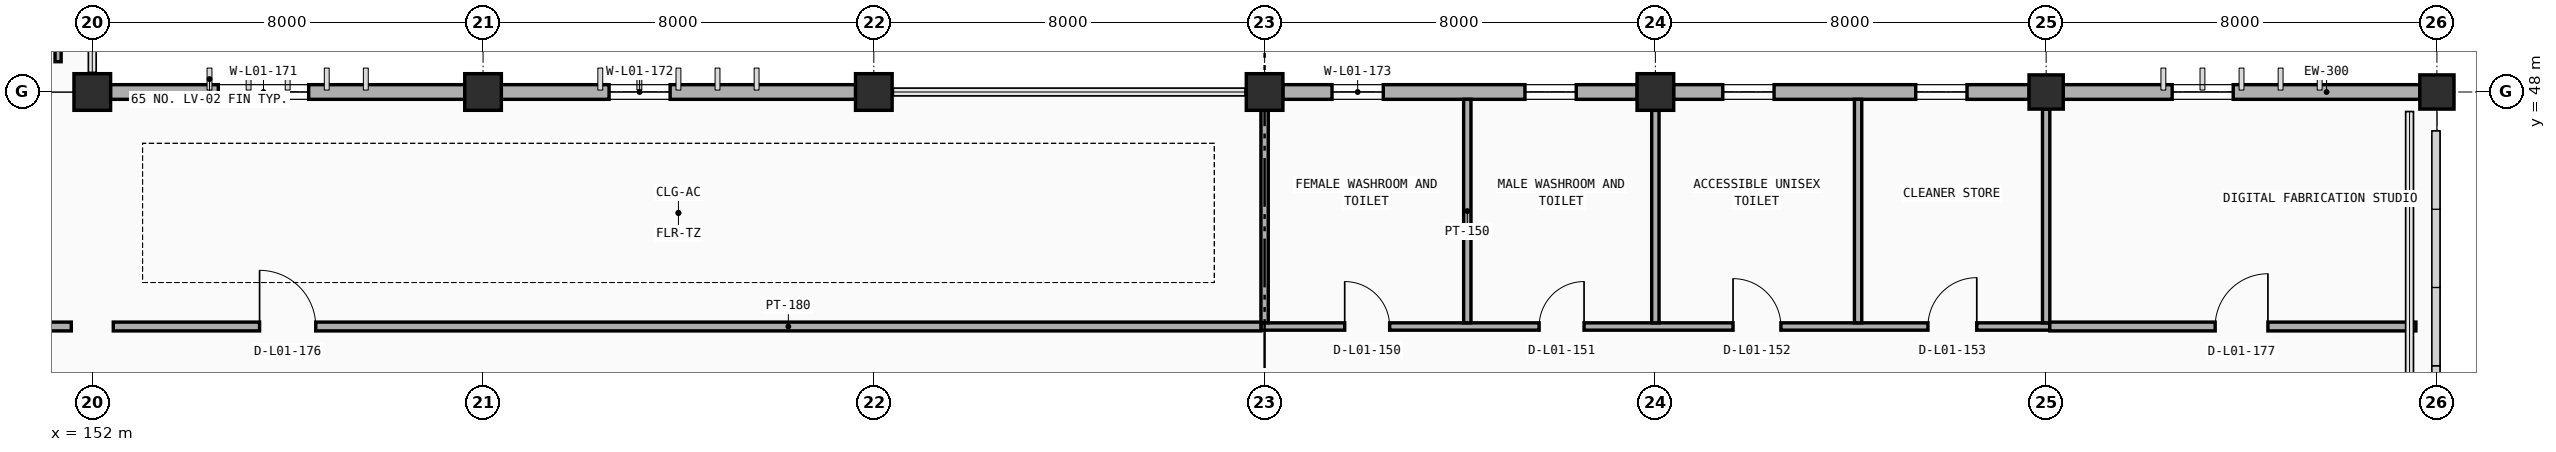
"""IFC4 building model, lengths in metres.
Left out: names, types, materials, properties, quantities, classifications, styles, units other than length and angle.
Written with IfcOpenShell. Run it as: python <this file> out.ifc"""

import sys

from ifc_helpers import new_model, si_unit, direction, frame, frame_2d, origin, origin_2d, place, context, subcontext, project, spatial, rectangle, extrude, element, fill, save


model = new_model("IFC4")
c1 = context("Model", 3, precision=1e-05, world=origin(), true_north=direction((0.0, 1.0)))
c2 = subcontext(c1, "Body", "Model", "MODEL_VIEW")
j1 = project(units=[si_unit("LENGTHUNIT", "METRE"), si_unit("PLANEANGLEUNIT", "RADIAN")], contexts=[c1])
p1 = place(None, origin())
s1 = spatial("IfcSite", under=j1, at=p1, CompositionType="ELEMENT")
p2 = place(p1, origin())
s2 = spatial("IfcBuilding", under=s1, at=p2, CompositionType="ELEMENT")
p3 = place(p2, origin())
s3 = spatial("IfcBuildingStorey", under=s2, at=p3, CompositionType="ELEMENT", Elevation=0.0)
for number, where, z_axis, x_axis in (
    (1, (152.0, 48.0, 0.0), (0.0, 0.0, 1.0), (1.0, 0.0, 0.0)),
    (2, (160.0, 48.0, 0.0), (0.0, 0.0, 1.0), (1.0, 0.0, 0.0)),
    (3, (168.0, 48.0, 0.0), (0.0, 0.0, 1.0), (1.0, 0.0, 0.0)),
    (4, (176.0, 48.0, 0.0), (0.0, 0.0, 1.0), (1.0, 0.0, 0.0)),
    (5, (184.0, 48.0, 0.0), (0.0, 0.0, 1.0), (1.0, 0.0, 0.0)),
):
    element("IfcColumn", number, at=place(p3, frame(where, z_axis=z_axis, x_axis=x_axis)), inside=s3, PredefinedType="COLUMN", context=c2, shape_type="SweptSolid", body=[
        extrude(rectangle(XDim=0.75, YDim=0.75, at=origin_2d()), origin(), (0.0, 0.0, 1.0), 4.8),
    ])
for number, where, z_axis, x_axis in (
    (6, (192.0, 48.0, 0.0), (0.0, 0.0, 1.0), (1.0, 0.0, 0.0)),
    (7, (200.0, 48.0, 0.0), (0.0, 0.0, 1.0), (1.0, 0.0, 0.0)),
):
    element("IfcColumn", number, at=place(p3, frame(where, z_axis=z_axis, x_axis=x_axis)), inside=s3, PredefinedType="COLUMN", context=c2, shape_type="SweptSolid", body=[
        extrude(rectangle(XDim=0.7, YDim=0.7, at=origin_2d()), origin(), (0.0, 0.0, 1.0), 4.8),
    ])
p4 = place(p3, frame((152.372, 48.0, 0.0), z_axis=(0.0, 0.0, 1.0), x_axis=(1.0, 0.0, 0.0)))
e8 = element("IfcWall", 8, at=p4, inside=s3, PredefinedType="STANDARD", context=c2, shape_type="SweptSolid", body=[
    extrude(rectangle(XDim=7.256, YDim=0.3, at=frame_2d((3.628, 0.0))), origin(), (0.0, 0.0, 1.0), 3.91),
])
p5 = place(p4, frame((2.208, 0.0, 0.9)))
e9 = element("IfcOpeningElement", 9, at=p5, cuts=e8, PredefinedType="OPENING", context=c2, shape_type="SweptSolid", body=[
    extrude(rectangle(XDim=1.85, YDim=1.7, at=frame_2d((0.925, 0.85))), frame((0.0, 0.16, 0.0), z_axis=(0.0, -1.0, 0.0), x_axis=(1.0, 0.0, 0.0)), (0.0, 0.0, 1.0), 0.32),
])
p6 = place(p3, frame((160.372, 48.0, 0.0), z_axis=(0.0, 0.0, 1.0), x_axis=(1.0, 0.0, 0.0)))
e10 = element("IfcWall", 10, at=p6, inside=s3, PredefinedType="STANDARD", context=c2, shape_type="SweptSolid", body=[
    extrude(rectangle(XDim=7.256, YDim=0.3, at=frame_2d((3.628, 0.0))), origin(), (0.0, 0.0, 1.0), 3.91),
])
p7 = place(p6, frame((2.208, 0.0, 0.9)))
e11 = element("IfcOpeningElement", 11, at=p7, cuts=e10, PredefinedType="OPENING", context=c2, shape_type="SweptSolid", body=[
    extrude(rectangle(XDim=1.25, YDim=1.7, at=frame_2d((0.625, 0.85))), frame((0.0, 0.16, 0.0), z_axis=(0.0, -1.0, 0.0), x_axis=(1.0, 0.0, 0.0)), (0.0, 0.0, 1.0), 0.32),
])
p8 = place(p3, frame((176.372, 48.0, 0.0), z_axis=(0.0, 0.0, 1.0), x_axis=(1.0, 0.0, 0.0)))
e12 = element("IfcWall", 12, at=p8, inside=s3, PredefinedType="STANDARD", context=c2, shape_type="SweptSolid", body=[
    extrude(rectangle(XDim=7.256, YDim=0.3, at=frame_2d((3.628, 0.0))), origin(), (0.0, 0.0, 1.0), 3.91),
])
p9 = place(p8, frame((1.008, 0.0, 1.15)))
e13 = element("IfcOpeningElement", 13, at=p9, cuts=e12, PredefinedType="OPENING", context=c2, shape_type="SweptSolid", body=[
    extrude(rectangle(XDim=1.05, YDim=1.25, at=frame_2d((0.525, 0.625))), frame((0.0, 0.16, 0.0), z_axis=(0.0, -1.0, 0.0), x_axis=(1.0, 0.0, 0.0)), (0.0, 0.0, 1.0), 0.32),
])
p10 = place(p8, frame((4.958, 0.0, 1.15)))
e14 = element("IfcOpeningElement", 14, at=p10, cuts=e12, PredefinedType="OPENING", context=c2, shape_type="SweptSolid", body=[
    extrude(rectangle(XDim=1.05, YDim=1.25, at=frame_2d((0.525, 0.625))), frame((0.0, 0.16, 0.0), z_axis=(0.0, -1.0, 0.0), x_axis=(1.0, 0.0, 0.0)), (0.0, 0.0, 1.0), 0.32),
])
p11 = place(p3, frame((184.372, 48.0, 0.0), z_axis=(0.0, 0.0, 1.0), x_axis=(1.0, 0.0, 0.0)))
e15 = element("IfcWall", 15, at=p11, inside=s3, PredefinedType="STANDARD", context=c2, shape_type="SweptSolid", body=[
    extrude(rectangle(XDim=7.281, YDim=0.3, at=frame_2d((3.641, 0.0))), origin(), (0.0, 0.0, 1.0), 3.91),
])
p12 = place(p11, frame((1.008, 0.0, 1.15)))
e16 = element("IfcOpeningElement", 16, at=p12, cuts=e15, PredefinedType="OPENING", context=c2, shape_type="SweptSolid", body=[
    extrude(rectangle(XDim=1.05, YDim=1.25, at=frame_2d((0.525, 0.625))), frame((0.0, 0.16, 0.0), z_axis=(0.0, -1.0, 0.0), x_axis=(1.0, 0.0, 0.0)), (0.0, 0.0, 1.0), 0.32),
])
p13 = place(p11, frame((4.958, 0.0, 1.15)))
e17 = element("IfcOpeningElement", 17, at=p13, cuts=e15, PredefinedType="OPENING", context=c2, shape_type="SweptSolid", body=[
    extrude(rectangle(XDim=1.05, YDim=1.25, at=frame_2d((0.525, 0.625))), frame((0.0, 0.16, 0.0), z_axis=(0.0, -1.0, 0.0), x_axis=(1.0, 0.0, 0.0)), (0.0, 0.0, 1.0), 0.32),
])
p14 = place(p3, frame((192.347, 48.0, 0.0), z_axis=(0.0, 0.0, 1.0), x_axis=(1.0, 0.0, 0.0)))
e18 = element("IfcWall", 18, at=p14, inside=s3, PredefinedType="STANDARD", context=c2, shape_type="SweptSolid", body=[
    extrude(rectangle(XDim=7.306, YDim=0.3, at=frame_2d((3.653, 0.0))), origin(), (0.0, 0.0, 1.0), 3.91),
])
p15 = place(p14, frame((2.233, 0.0, 0.9)))
e19 = element("IfcOpeningElement", 19, at=p15, cuts=e18, PredefinedType="OPENING", context=c2, shape_type="SweptSolid", body=[
    extrude(rectangle(XDim=1.25, YDim=1.7, at=frame_2d((0.625, 0.85))), frame((0.0, 0.16, 0.0), z_axis=(0.0, -1.0, 0.0), x_axis=(1.0, 0.0, 0.0)), (0.0, 0.0, 1.0), 0.32),
])
p16 = place(p3, frame((199.76, 47.78, 0.0), z_axis=(0.0, 0.0, 1.0), x_axis=(-1.0, 0.0, 0.0)))
e20 = element("IfcWall", 20, at=p16, inside=s3, PredefinedType="PARAPET", context=c2, shape_type="SweptSolid", body=[
    extrude(rectangle(XDim=0.32, YDim=0.2, at=frame_2d((0.16, 0.0))), origin(), (0.0, 0.0, 1.0), 3.95),
])
p17 = place(p3, frame((175.925, 43.2, 0.0), z_axis=(0.0, 0.0, 1.0), x_axis=(1.0, 0.0, 0.0)))
e21 = element("IfcWall", 21, at=p17, inside=s3, PredefinedType="PARTITIONING", context=c2, shape_type="SweptSolid", body=[
    extrude(rectangle(XDim=16.15, YDim=0.15, at=frame_2d((8.075, 0.0))), origin(), (0.0, 0.0, 1.0), 3.9),
])
p18 = place(p17, frame((1.715, 0.0, 0.0)))
e22 = element("IfcOpeningElement", 22, at=p18, cuts=e21, PredefinedType="OPENING", context=c2, shape_type="SweptSolid", body=[
    extrude(rectangle(XDim=0.92, YDim=2.12, at=frame_2d((0.46, 1.06))), frame((0.0, 0.085, 0.0), z_axis=(0.0, -1.0, 0.0), x_axis=(1.0, 0.0, 0.0)), (0.0, 0.0, 1.0), 0.17),
])
p19 = place(p17, frame((5.695, 0.0, 0.0)))
e23 = element("IfcOpeningElement", 23, at=p19, cuts=e21, PredefinedType="OPENING", context=c2, shape_type="SweptSolid", body=[
    extrude(rectangle(XDim=0.92, YDim=2.12, at=frame_2d((0.46, 1.06))), frame((0.0, 0.085, 0.0), z_axis=(0.0, -1.0, 0.0), x_axis=(1.0, 0.0, 0.0)), (0.0, 0.0, 1.0), 0.17),
])
p20 = place(p17, frame((9.665, 0.0, 0.0)))
e24 = element("IfcOpeningElement", 24, at=p20, cuts=e21, PredefinedType="OPENING", context=c2, shape_type="SweptSolid", body=[
    extrude(rectangle(XDim=0.98, YDim=2.12, at=frame_2d((0.49, 1.06))), frame((0.0, 0.085, 0.0), z_axis=(0.0, -1.0, 0.0), x_axis=(1.0, 0.0, 0.0)), (0.0, 0.0, 1.0), 0.17),
])
p21 = place(p17, frame((13.655, 0.0, 0.0)))
e25 = element("IfcOpeningElement", 25, at=p21, cuts=e21, PredefinedType="OPENING", context=c2, shape_type="SweptSolid", body=[
    extrude(rectangle(XDim=1.0, YDim=2.15, at=frame_2d((0.5, 1.075))), frame((0.0, 0.085, 0.0), z_axis=(0.0, -1.0, 0.0), x_axis=(1.0, 0.0, 0.0)), (0.0, 0.0, 1.0), 0.17),
])
p22 = place(p3, frame((176.0, 43.275, 0.0), z_axis=(0.0, 0.0, 1.0), x_axis=(0.0, 1.0, 0.0)))
e26 = element("IfcWall", 26, at=p22, inside=s3, PredefinedType="PARTITIONING", context=c2, shape_type="SweptSolid", body=[
    extrude(rectangle(XDim=4.35, YDim=0.15, at=frame_2d((2.175, 0.0))), origin(), (0.0, 0.0, 1.0), 3.76),
])
p23 = place(p3, frame((180.15, 43.275, 0.0), z_axis=(0.0, 0.0, 1.0), x_axis=(0.0, 1.0, 0.0)))
e27 = element("IfcWall", 27, at=p23, inside=s3, PredefinedType="PARTITIONING", context=c2, shape_type="SweptSolid", body=[
    extrude(rectangle(XDim=4.575, YDim=0.15, at=frame_2d((2.288, 0.0))), origin(), (0.0, 0.0, 1.0), 3.9),
])
p24 = place(p3, frame((184.0, 43.275, 0.0), z_axis=(0.0, 0.0, 1.0), x_axis=(0.0, 1.0, 0.0)))
e28 = element("IfcWall", 28, at=p24, inside=s3, PredefinedType="PARTITIONING", context=c2, shape_type="SweptSolid", body=[
    extrude(rectangle(XDim=4.35, YDim=0.15, at=frame_2d((2.175, 0.0))), origin(), (0.0, 0.0, 1.0), 3.76),
])
p25 = place(p3, frame((188.15, 43.275, 0.0), z_axis=(0.0, 0.0, 1.0), x_axis=(0.0, 1.0, 0.0)))
e29 = element("IfcWall", 29, at=p25, inside=s3, PredefinedType="PARTITIONING", context=c2, shape_type="SweptSolid", body=[
    extrude(rectangle(XDim=4.575, YDim=0.15, at=frame_2d((2.288, 0.0))), origin(), (0.0, 0.0, 1.0), 3.9),
])
p26 = place(p3, frame((192.0, 43.275, 0.0), z_axis=(0.0, 0.0, 1.0), x_axis=(0.0, 1.0, 0.0)))
e30 = element("IfcWall", 30, at=p26, inside=s3, PredefinedType="PARTITIONING", context=c2, shape_type="SweptSolid", body=[
    extrude(rectangle(XDim=4.375, YDim=0.15, at=frame_2d((2.188, 0.0))), origin(), (0.0, 0.0, 1.0), 3.76),
])
p27 = place(p3, frame((128.43, 43.2, 0.0), z_axis=(0.0, 0.0, 1.0), x_axis=(1.0, 0.0, 0.0)))
e31 = element("IfcWall", 31, at=p27, inside=s3, PredefinedType="PARTITIONING", context=c2, shape_type="SweptSolid", body=[
    extrude(rectangle(XDim=23.14, YDim=0.18, at=frame_2d((11.57, 0.0))), origin(), (0.0, 0.0, 1.0), 3.9),
])
p28 = place(p27, frame((3.07, 0.0, 0.0)))
e32 = element("IfcOpeningElement", 32, at=p28, cuts=e31, PredefinedType="OPENING", context=c2, shape_type="SweptSolid", body=[
    extrude(rectangle(XDim=1.0, YDim=2.15, at=frame_2d((0.5, 1.075))), frame((0.0, 0.1, 0.0), z_axis=(0.0, -1.0, 0.0), x_axis=(1.0, 0.0, 0.0)), (0.0, 0.0, 1.0), 0.2),
])
p29 = place(p3, frame((152.43, 43.2, 0.0), z_axis=(0.0, 0.0, 1.0), x_axis=(1.0, 0.0, 0.0)))
e33 = element("IfcWall", 33, at=p29, inside=s3, PredefinedType="PARTITIONING", context=c2, shape_type="SweptSolid", body=[
    extrude(rectangle(XDim=23.495, YDim=0.18, at=frame_2d((11.748, 0.0))), origin(), (0.0, 0.0, 1.0), 3.9),
])
p30 = place(p29, frame((2.995, 0.0, 0.0)))
e34 = element("IfcOpeningElement", 34, at=p30, cuts=e33, PredefinedType="OPENING", context=c2, shape_type="SweptSolid", body=[
    extrude(rectangle(XDim=1.15, YDim=2.15, at=frame_2d((0.575, 1.075))), frame((0.0, 0.1, 0.0), z_axis=(0.0, -1.0, 0.0), x_axis=(1.0, 0.0, 0.0)), (0.0, 0.0, 1.0), 0.2),
])
p31 = place(p3, frame((192.075, 43.2, 0.0), z_axis=(0.0, 0.0, 1.0), x_axis=(1.0, 0.0, 0.0)))
e35 = element("IfcWall", 35, at=p31, inside=s3, PredefinedType="PARTITIONING", context=c2, shape_type="SweptSolid", body=[
    extrude(rectangle(XDim=7.495, YDim=0.18, at=frame_2d((3.748, 0.0))), origin(), (0.0, 0.0, 1.0), 3.9),
])
p32 = place(p31, frame((3.385, 0.0, 0.0)))
e36 = element("IfcOpeningElement", 36, at=p32, cuts=e35, PredefinedType="OPENING", context=c2, shape_type="SweptSolid", body=[
    extrude(rectangle(XDim=1.08, YDim=2.15, at=frame_2d((0.54, 1.075))), frame((0.0, 0.1, 0.0), z_axis=(0.0, -1.0, 0.0), x_axis=(1.0, 0.0, 0.0)), (0.0, 0.0, 1.0), 0.2),
])
p33 = place(p3, frame((151.3, 48.62, 0.0), z_axis=(0.0, 0.0, 1.0), x_axis=(0.0, 1.0, 0.0)))
e37 = element("IfcWall", 37, at=p33, inside=s3, PredefinedType="PARTITIONING", context=c2, shape_type="SweptSolid", body=[
    extrude(rectangle(XDim=6.76, YDim=0.125, at=frame_2d((3.38, 0.0))), origin(), (0.0, 0.0, 1.0), 3.9),
])
p34 = place(p5, origin())
e38 = element("IfcWindow", 38, at=p34, inside=s3, PartitioningType="DOUBLE_PANEL_VERTICAL", PredefinedType="WINDOW", context=c2, shape_type="SweptSolid", body=[
    extrude(rectangle(XDim=1.85, YDim=1.7, at=frame_2d((0.925, 0.85))), frame((0.0, 0.03, 0.0), z_axis=(0.0, -1.0, 0.0), x_axis=(1.0, 0.0, 0.0)), (0.0, 0.0, 1.0), 0.06),
])
fill(e9, e38)
p35 = place(p7, origin())
e39 = element("IfcWindow", 39, at=p35, inside=s3, PartitioningType="SINGLE_PANEL", PredefinedType="WINDOW", context=c2, shape_type="SweptSolid", body=[
    extrude(rectangle(XDim=1.25, YDim=1.7, at=frame_2d((0.625, 0.85))), frame((0.0, 0.03, 0.0), z_axis=(0.0, -1.0, 0.0), x_axis=(1.0, 0.0, 0.0)), (0.0, 0.0, 1.0), 0.06),
])
fill(e11, e39)
p36 = place(p9, origin())
e40 = element("IfcWindow", 40, at=p36, inside=s3, PartitioningType="SINGLE_PANEL", PredefinedType="WINDOW", context=c2, shape_type="SweptSolid", body=[
    extrude(rectangle(XDim=1.05, YDim=1.25, at=frame_2d((0.525, 0.625))), frame((0.0, 0.03, 0.0), z_axis=(0.0, -1.0, 0.0), x_axis=(1.0, 0.0, 0.0)), (0.0, 0.0, 1.0), 0.06),
])
fill(e13, e40)
p37 = place(p10, origin())
e41 = element("IfcWindow", 41, at=p37, inside=s3, PartitioningType="SINGLE_PANEL", PredefinedType="WINDOW", context=c2, shape_type="SweptSolid", body=[
    extrude(rectangle(XDim=1.05, YDim=1.25, at=frame_2d((0.525, 0.625))), frame((0.0, 0.03, 0.0), z_axis=(0.0, -1.0, 0.0), x_axis=(1.0, 0.0, 0.0)), (0.0, 0.0, 1.0), 0.06),
])
fill(e14, e41)
p38 = place(p12, origin())
e42 = element("IfcWindow", 42, at=p38, inside=s3, PartitioningType="SINGLE_PANEL", PredefinedType="WINDOW", context=c2, shape_type="SweptSolid", body=[
    extrude(rectangle(XDim=1.05, YDim=1.25, at=frame_2d((0.525, 0.625))), frame((0.0, 0.03, 0.0), z_axis=(0.0, -1.0, 0.0), x_axis=(1.0, 0.0, 0.0)), (0.0, 0.0, 1.0), 0.06),
])
fill(e16, e42)
p39 = place(p13, origin())
e43 = element("IfcWindow", 43, at=p39, inside=s3, PartitioningType="SINGLE_PANEL", PredefinedType="WINDOW", context=c2, shape_type="SweptSolid", body=[
    extrude(rectangle(XDim=1.05, YDim=1.25, at=frame_2d((0.525, 0.625))), frame((0.0, 0.03, 0.0), z_axis=(0.0, -1.0, 0.0), x_axis=(1.0, 0.0, 0.0)), (0.0, 0.0, 1.0), 0.06),
])
fill(e17, e43)
p40 = place(p15, origin())
e44 = element("IfcWindow", 44, at=p40, inside=s3, PartitioningType="SINGLE_PANEL", PredefinedType="WINDOW", context=c2, shape_type="SweptSolid", body=[
    extrude(rectangle(XDim=1.25, YDim=1.7, at=frame_2d((0.625, 0.85))), frame((0.0, 0.03, 0.0), z_axis=(0.0, -1.0, 0.0), x_axis=(1.0, 0.0, 0.0)), (0.0, 0.0, 1.0), 0.06),
])
fill(e19, e44)
p41 = place(p18, origin())
e45 = element("IfcDoor", 45, at=p41, inside=s3, OperationType="SINGLE_SWING_LEFT", PredefinedType="DOOR", context=c2, shape_type="SweptSolid", body=[
    extrude(rectangle(XDim=0.92, YDim=2.12, at=frame_2d((0.46, 1.06))), frame((0.0, 0.025, 0.0), z_axis=(0.0, -1.0, 0.0), x_axis=(1.0, 0.0, 0.0)), (0.0, 0.0, 1.0), 0.05),
])
fill(e22, e45)
p42 = place(p19, origin())
e46 = element("IfcDoor", 46, at=p42, inside=s3, OperationType="SINGLE_SWING_RIGHT", PredefinedType="DOOR", context=c2, shape_type="SweptSolid", body=[
    extrude(rectangle(XDim=0.92, YDim=2.12, at=frame_2d((0.46, 1.06))), frame((0.0, 0.025, 0.0), z_axis=(0.0, -1.0, 0.0), x_axis=(1.0, 0.0, 0.0)), (0.0, 0.0, 1.0), 0.05),
])
fill(e23, e46)
p43 = place(p20, origin())
e47 = element("IfcDoor", 47, at=p43, inside=s3, OperationType="SINGLE_SWING_LEFT", PredefinedType="DOOR", context=c2, shape_type="SweptSolid", body=[
    extrude(rectangle(XDim=0.98, YDim=2.12, at=frame_2d((0.49, 1.06))), frame((0.0, 0.025, 0.0), z_axis=(0.0, -1.0, 0.0), x_axis=(1.0, 0.0, 0.0)), (0.0, 0.0, 1.0), 0.05),
])
fill(e24, e47)
p44 = place(p21, origin())
e48 = element("IfcDoor", 48, at=p44, inside=s3, OperationType="SINGLE_SWING_RIGHT", PredefinedType="DOOR", context=c2, shape_type="SweptSolid", body=[
    extrude(rectangle(XDim=1.0, YDim=2.15, at=frame_2d((0.5, 1.075))), frame((0.0, 0.025, 0.0), z_axis=(0.0, -1.0, 0.0), x_axis=(1.0, 0.0, 0.0)), (0.0, 0.0, 1.0), 0.05),
])
fill(e25, e48)
p45 = place(p30, origin())
e49 = element("IfcDoor", 49, at=p45, inside=s3, OperationType="SINGLE_SWING_LEFT", PredefinedType="DOOR", context=c2, shape_type="SweptSolid", body=[
    extrude(rectangle(XDim=1.15, YDim=2.15, at=frame_2d((0.575, 1.075))), frame((0.0, 0.025, 0.0), z_axis=(0.0, -1.0, 0.0), x_axis=(1.0, 0.0, 0.0)), (0.0, 0.0, 1.0), 0.05),
])
fill(e34, e49)
p46 = place(p32, origin())
e50 = element("IfcDoor", 50, at=p46, inside=s3, OperationType="SINGLE_SWING_RIGHT", PredefinedType="DOOR", context=c2, shape_type="SweptSolid", body=[
    extrude(rectangle(XDim=1.08, YDim=2.15, at=frame_2d((0.54, 1.075))), frame((0.0, 0.025, 0.0), z_axis=(0.0, -1.0, 0.0), x_axis=(1.0, 0.0, 0.0)), (0.0, 0.0, 1.0), 0.05),
])
fill(e36, e50)
save(model, sys.argv[1])
